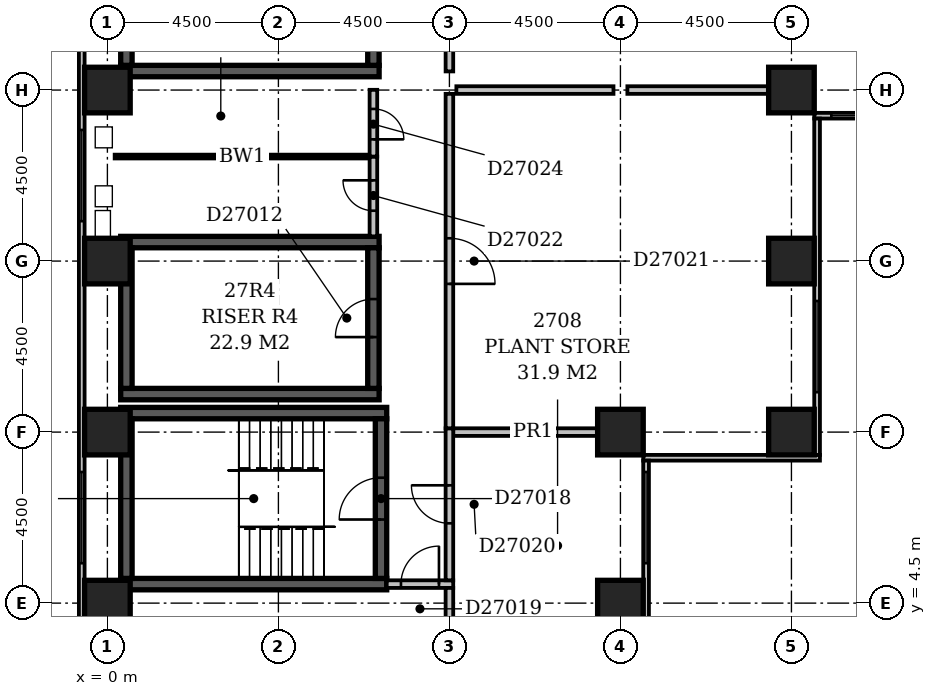
"""IFC4 building model, lengths in metres.
Left out: names, types, materials, properties, quantities, classifications, styles, units other than length and angle.
Written with IfcOpenShell. Run it as: python <this file> out.ifc"""

import sys

from ifc_helpers import new_model, si_unit, direction, frame, frame_2d, origin, origin_2d, place, context, subcontext, project, spatial, rectangle, extrude, element, fill, save


model = new_model("IFC4")
c1 = context("Model", 3, precision=1e-05, world=origin(), true_north=direction((0.0, 1.0)))
c2 = subcontext(c1, "Body", "Model", "MODEL_VIEW")
j1 = project(units=[si_unit("LENGTHUNIT", "METRE"), si_unit("PLANEANGLEUNIT", "RADIAN")], contexts=[c1])
p1 = place(None, origin())
s1 = spatial("IfcSite", under=j1, at=p1, CompositionType="ELEMENT")
p2 = place(p1, origin())
s2 = spatial("IfcBuilding", under=s1, at=p2, CompositionType="ELEMENT")
p3 = place(p2, frame((0.0, 0.0, 108.2)))
s3 = spatial("IfcBuildingStorey", under=s2, at=p3, CompositionType="ELEMENT", Elevation=108.2)
for number, where, z_axis, x_axis in (
    (1, (0.35, 5.0, -0.45), (0.0, 0.0, 1.0), (1.0, 0.0, 0.0)),
    (2, (0.35, 9.5, -0.45), (0.0, 0.0, 1.0), (1.0, 0.0, 0.0)),
):
    element("IfcWall", number, at=place(p3, frame(where, z_axis=z_axis, x_axis=x_axis)), inside=s3, PredefinedType="SHEAR", context=c2, shape_type="SweptSolid", body=[
        extrude(rectangle(XDim=7.0, YDim=0.3, at=frame_2d((3.5, 0.0))), origin(), (0.0, 0.0, 1.0), 5.35),
    ])
for number, where, z_axis, x_axis in (
    (3, (0.35, 10.0, -0.45), (0.0, 0.0, 1.0), (1.0, 0.0, 0.0)),
    (4, (0.35, 14.0, -0.45), (0.0, 0.0, 1.0), (1.0, 0.0, 0.0)),
    (5, (0.35, 18.5, -0.45), (0.0, 0.0, 1.0), (1.0, 0.0, 0.0)),
):
    element("IfcWall", number, at=place(p3, frame(where, z_axis=z_axis, x_axis=x_axis)), inside=s3, PredefinedType="SHEAR", context=c2, shape_type="SweptSolid", body=[
        extrude(rectangle(XDim=6.8, YDim=0.3, at=frame_2d((3.4, 0.0))), origin(), (0.0, 0.0, 1.0), 5.35),
    ])
p4 = place(p3, frame((0.5, 5.15, -0.45), z_axis=(0.0, 0.0, 1.0), x_axis=(0.0, 1.0, 0.0)))
e6 = element("IfcWall", 6, at=p4, inside=s3, PredefinedType="SHEAR", context=c2, shape_type="SweptSolid", body=[
    extrude(rectangle(XDim=4.2, YDim=0.3, at=frame_2d((2.1, 0.0))), origin(), (0.0, 0.0, 1.0), 5.35),
])
for number, where, z_axis, x_axis in (
    (7, (0.5, 10.15, -0.45), (0.0, 0.0, 1.0), (0.0, 1.0, 0.0)),
    (8, (0.5, 18.65, -0.45), (0.0, 0.0, 1.0), (0.0, 1.0, 0.0)),
):
    element("IfcWall", number, at=place(p3, frame(where, z_axis=z_axis, x_axis=x_axis)), inside=s3, PredefinedType="SHEAR", context=c2, shape_type="SweptSolid", body=[
        extrude(rectangle(XDim=3.7, YDim=0.3, at=frame_2d((1.85, 0.0))), origin(), (0.0, 0.0, 1.0), 5.35),
    ])
p5 = place(p3, frame((7.0, 10.15, -0.45), z_axis=(0.0, 0.0, 1.0), x_axis=(0.0, 1.0, 0.0)))
e9 = element("IfcWall", 9, at=p5, inside=s3, PredefinedType="SHEAR", context=c2, shape_type="SweptSolid", body=[
    extrude(rectangle(XDim=3.7, YDim=0.3, at=frame_2d((1.85, 0.0))), origin(), (0.0, 0.0, 1.0), 5.35),
])
p6 = place(p5, frame((1.35, 0.0, 0.45)))
e10 = element("IfcOpeningElement", 10, at=p6, cuts=e9, PredefinedType="OPENING", context=c2, shape_type="SweptSolid", body=[
    extrude(rectangle(XDim=1.0, YDim=2.1, at=frame_2d((0.5, 1.05))), frame((0.0, 0.162, 0.0), z_axis=(0.0, -1.0, 0.0), x_axis=(1.0, 0.0, 0.0)), (0.0, 0.0, 1.0), 0.324),
])
p7 = place(p3, frame((7.0, 18.65, -0.45), z_axis=(0.0, 0.0, 1.0), x_axis=(0.0, 1.0, 0.0)))
e11 = element("IfcWall", 11, at=p7, inside=s3, PredefinedType="SHEAR", context=c2, shape_type="SweptSolid", body=[
    extrude(rectangle(XDim=3.7, YDim=0.3, at=frame_2d((1.85, 0.0))), origin(), (0.0, 0.0, 1.0), 5.35),
])
p8 = place(p7, frame((1.35, 0.0, 0.45)))
e12 = element("IfcOpeningElement", 12, at=p8, cuts=e11, PredefinedType="OPENING", context=c2, shape_type="SweptSolid", body=[
    extrude(rectangle(XDim=1.0, YDim=2.1, at=frame_2d((0.5, 1.05))), frame((0.0, 0.162, 0.0), z_axis=(0.0, -1.0, 0.0), x_axis=(1.0, 0.0, 0.0)), (0.0, 0.0, 1.0), 0.324),
])
p9 = place(p3, frame((7.2, 5.15, -0.45), z_axis=(0.0, 0.0, 1.0), x_axis=(0.0, 1.0, 0.0)))
e13 = element("IfcWall", 13, at=p9, inside=s3, PredefinedType="SHEAR", context=c2, shape_type="SweptSolid", body=[
    extrude(rectangle(XDim=4.2, YDim=0.3, at=frame_2d((2.1, 0.0))), origin(), (0.0, 0.0, 1.0), 5.35),
])
p10 = place(p9, frame((1.55, 0.0, 0.45)))
e14 = element("IfcOpeningElement", 14, at=p10, cuts=e13, PredefinedType="OPENING", context=c2, shape_type="SweptSolid", body=[
    extrude(rectangle(XDim=1.1, YDim=2.1, at=frame_2d((0.55, 1.05))), frame((0.0, 0.162, 0.0), z_axis=(0.0, -1.0, 0.0), x_axis=(1.0, 0.0, 0.0)), (0.0, 0.0, 1.0), 0.324),
])
for number, where, z_axis, x_axis in (
    (15, (0.0, 4.5, -0.45), (0.0, 0.0, 1.0), (1.0, 0.0, 0.0)),
    (16, (13.5, 4.5, -0.45), (0.0, 0.0, 1.0), (1.0, 0.0, 0.0)),
    (17, (0.0, 9.0, -0.45), (0.0, 0.0, 1.0), (1.0, 0.0, 0.0)),
    (18, (13.5, 9.0, -0.45), (0.0, 0.0, 1.0), (1.0, 0.0, 0.0)),
    (19, (18.0, 9.0, -0.45), (0.0, 0.0, 1.0), (1.0, 0.0, 0.0)),
    (20, (0.0, 13.5, -0.45), (0.0, 0.0, 1.0), (1.0, 0.0, 0.0)),
    (21, (18.0, 13.5, -0.45), (0.0, 0.0, 1.0), (1.0, 0.0, 0.0)),
    (22, (0.0, 18.0, -0.45), (0.0, 0.0, 1.0), (1.0, 0.0, 0.0)),
    (23, (18.0, 18.0, -0.45), (0.0, 0.0, 1.0), (1.0, 0.0, 0.0)),
):
    element("IfcColumn", number, at=place(p3, frame(where, z_axis=z_axis, x_axis=x_axis)), inside=s3, PredefinedType="COLUMN", context=c2, shape_type="SweptSolid", body=[
        extrude(rectangle(XDim=1.2, YDim=1.2, at=origin_2d()), origin(), (0.0, 0.0, 1.0), 5.35),
    ])
p11 = place(p3, frame((14.175, 3.9, 0.0), z_axis=(0.0, 0.0, 1.0), x_axis=(0.0, 1.0, 0.0)))
e24 = element("IfcWall", 24, at=p11, inside=s3, PredefinedType="STANDARD", context=c2, shape_type="SweptSolid", body=[
    extrude(rectangle(XDim=4.35, YDim=0.15, at=frame_2d((2.175, 0.0))), origin(), (0.0, 0.0, 1.0), 4.3),
])
p12 = place(p11, frame((1.65, 0.0, 0.6)))
e25 = element("IfcOpeningElement", 25, at=p12, cuts=e24, PredefinedType="OPENING", context=c2, shape_type="SweptSolid", body=[
    extrude(rectangle(XDim=2.4, YDim=2.4, at=frame_2d((1.2, 1.2))), frame((0.0, 0.087, 0.0), z_axis=(0.0, -1.0, 0.0), x_axis=(1.0, 0.0, 0.0)), (0.0, 0.0, 1.0), 0.174),
])
p13 = place(p3, frame((14.1, 8.325, 0.0), z_axis=(0.0, 0.0, 1.0), x_axis=(1.0, 0.0, 0.0)))
e26 = element("IfcWall", 26, at=p13, inside=s3, PredefinedType="STANDARD", context=c2, shape_type="SweptSolid", body=[
    extrude(rectangle(XDim=4.65, YDim=0.15, at=frame_2d((2.325, 0.0))), origin(), (0.0, 0.0, 1.0), 4.3),
])
p14 = place(p3, frame((18.675, 8.4, 0.0), z_axis=(0.0, 0.0, 1.0), x_axis=(0.0, 1.0, 0.0)))
e27 = element("IfcWall", 27, at=p14, inside=s3, PredefinedType="STANDARD", context=c2, shape_type="SweptSolid", body=[
    extrude(rectangle(XDim=8.85, YDim=0.15, at=frame_2d((4.425, 0.0))), origin(), (0.0, 0.0, 1.0), 4.3),
])
p15 = place(p14, frame((1.65, 0.0, 0.6)))
e28 = element("IfcOpeningElement", 28, at=p15, cuts=e27, PredefinedType="OPENING", context=c2, shape_type="SweptSolid", body=[
    extrude(rectangle(XDim=2.4, YDim=2.4, at=frame_2d((1.2, 1.2))), frame((0.0, 0.087, 0.0), z_axis=(0.0, -1.0, 0.0), x_axis=(1.0, 0.0, 0.0)), (0.0, 0.0, 1.0), 0.174),
])
p16 = place(p3, frame((18.6, 17.325, 0.0), z_axis=(0.0, 0.0, 1.0), x_axis=(1.0, 0.0, 0.0)))
e29 = element("IfcWall", 29, at=p16, inside=s3, PredefinedType="STANDARD", context=c2, shape_type="SweptSolid", body=[
    extrude(rectangle(XDim=4.65, YDim=0.15, at=frame_2d((2.325, 0.0))), origin(), (0.0, 0.0, 1.0), 4.3),
])
p17 = place(p16, frame((0.45, 0.0, 0.6)))
e30 = element("IfcOpeningElement", 30, at=p17, cuts=e29, PredefinedType="OPENING", context=c2, shape_type="SweptSolid", body=[
    extrude(rectangle(XDim=2.4, YDim=2.4, at=frame_2d((1.2, 1.2))), frame((0.0, 0.087, 0.0), z_axis=(0.0, -1.0, 0.0), x_axis=(1.0, 0.0, 0.0)), (0.0, 0.0, 1.0), 0.174),
])
p18 = place(p3, frame((-0.675, 59.1, 0.0), z_axis=(0.0, 0.0, 1.0), x_axis=(0.0, -1.0, 0.0)))
e31 = element("IfcWall", 31, at=p18, inside=s3, PredefinedType="STANDARD", context=c2, shape_type="SweptSolid", body=[
    extrude(rectangle(XDim=55.35, YDim=0.15, at=frame_2d((27.675, 0.0))), origin(), (0.0, 0.0, 1.0), 4.3),
])
p19 = place(p18, frame((5.95, 0.0, 0.6)))
e32 = element("IfcOpeningElement", 32, at=p19, cuts=e31, PredefinedType="OPENING", context=c2, shape_type="SweptSolid", body=[
    extrude(rectangle(XDim=2.4, YDim=2.4, at=frame_2d((1.2, 1.2))), frame((0.0, 0.087, 0.0), z_axis=(0.0, -1.0, 0.0), x_axis=(1.0, 0.0, 0.0)), (0.0, 0.0, 1.0), 0.174),
])
p20 = place(p18, frame((15.15, 0.0, 0.6)))
e33 = element("IfcOpeningElement", 33, at=p20, cuts=e31, PredefinedType="OPENING", context=c2, shape_type="SweptSolid", body=[
    extrude(rectangle(XDim=2.4, YDim=2.4, at=frame_2d((1.2, 1.2))), frame((0.0, 0.087, 0.0), z_axis=(0.0, -1.0, 0.0), x_axis=(1.0, 0.0, 0.0)), (0.0, 0.0, 1.0), 0.174),
])
p21 = place(p18, frame((24.15, 0.0, 0.6)))
e34 = element("IfcOpeningElement", 34, at=p21, cuts=e31, PredefinedType="OPENING", context=c2, shape_type="SweptSolid", body=[
    extrude(rectangle(XDim=2.4, YDim=2.4, at=frame_2d((1.2, 1.2))), frame((0.0, 0.087, 0.0), z_axis=(0.0, -1.0, 0.0), x_axis=(1.0, 0.0, 0.0)), (0.0, 0.0, 1.0), 0.174),
])
p22 = place(p18, frame((32.95, 0.0, 0.6)))
e35 = element("IfcOpeningElement", 35, at=p22, cuts=e31, PredefinedType="OPENING", context=c2, shape_type="SweptSolid", body=[
    extrude(rectangle(XDim=2.4, YDim=2.4, at=frame_2d((1.2, 1.2))), frame((0.0, 0.087, 0.0), z_axis=(0.0, -1.0, 0.0), x_axis=(1.0, 0.0, 0.0)), (0.0, 0.0, 1.0), 0.174),
])
p23 = place(p18, frame((42.15, 0.0, 0.6)))
e36 = element("IfcOpeningElement", 36, at=p23, cuts=e31, PredefinedType="OPENING", context=c2, shape_type="SweptSolid", body=[
    extrude(rectangle(XDim=2.4, YDim=2.4, at=frame_2d((1.2, 1.2))), frame((0.0, 0.087, 0.0), z_axis=(0.0, -1.0, 0.0), x_axis=(1.0, 0.0, 0.0)), (0.0, 0.0, 1.0), 0.174),
])
p24 = place(p18, frame((51.15, 0.0, 0.6)))
e37 = element("IfcOpeningElement", 37, at=p24, cuts=e31, PredefinedType="OPENING", context=c2, shape_type="SweptSolid", body=[
    extrude(rectangle(XDim=2.4, YDim=2.4, at=frame_2d((1.2, 1.2))), frame((0.0, 0.087, 0.0), z_axis=(0.0, -1.0, 0.0), x_axis=(1.0, 0.0, 0.0)), (0.0, 0.0, 1.0), 0.174),
])
p25 = place(p3, frame((9.0, 0.271, 0.0), z_axis=(0.0, 0.0, 1.0), x_axis=(0.0, 1.0, 0.0)))
e38 = element("IfcWall", 38, at=p25, inside=s3, PredefinedType="PARTITIONING", context=c2, shape_type="SweptSolid", body=[
    extrude(rectangle(XDim=4.629, YDim=0.2, at=frame_2d((2.314, 0.0))), origin(), (0.0, 0.0, 1.0), 4.9),
])
p26 = place(p3, frame((7.35, 5.0, 0.0), z_axis=(0.0, 0.0, 1.0), x_axis=(1.0, 0.0, 0.0)))
e39 = element("IfcWall", 39, at=p26, inside=s3, PredefinedType="PARTITIONING", context=c2, shape_type="SweptSolid", body=[
    extrude(rectangle(XDim=1.75, YDim=0.2, at=frame_2d((0.875, 0.0))), origin(), (0.0, 0.0, 1.0), 4.9),
])
p27 = place(p26, frame((0.375, 0.0, 0.0)))
e40 = element("IfcOpeningElement", 40, at=p27, cuts=e39, PredefinedType="OPENING", context=c2, shape_type="SweptSolid", body=[
    extrude(rectangle(XDim=1.0, YDim=2.1, at=frame_2d((0.5, 1.05))), frame((0.0, 0.112, 0.0), z_axis=(0.0, -1.0, 0.0), x_axis=(1.0, 0.0, 0.0)), (0.0, 0.0, 1.0), 0.224),
])
p28 = place(p3, frame((9.0, 5.1, 0.0), z_axis=(0.0, 0.0, 1.0), x_axis=(0.0, 1.0, 0.0)))
e41 = element("IfcWall", 41, at=p28, inside=s3, PredefinedType="PARTITIONING", context=c2, shape_type="SweptSolid", body=[
    extrude(rectangle(XDim=4.0, YDim=0.2, at=frame_2d((2.0, 0.0))), origin(), (0.0, 0.0, 1.0), 4.9),
])
p29 = place(p28, frame((1.5, 0.0, 0.0)))
e42 = element("IfcOpeningElement", 42, at=p29, cuts=e41, PredefinedType="OPENING", context=c2, shape_type="SweptSolid", body=[
    extrude(rectangle(XDim=1.0, YDim=2.1, at=frame_2d((0.5, 1.05))), frame((0.0, 0.112, 0.0), z_axis=(0.0, -1.0, 0.0), x_axis=(1.0, 0.0, 0.0)), (0.0, 0.0, 1.0), 0.224),
])
p30 = place(p3, frame((9.0, 9.1, 0.0), z_axis=(0.0, 0.0, 1.0), x_axis=(0.0, 1.0, 0.0)))
e43 = element("IfcWall", 43, at=p30, inside=s3, PredefinedType="PARTITIONING", context=c2, shape_type="SweptSolid", body=[
    extrude(rectangle(XDim=8.8, YDim=0.2, at=frame_2d((4.4, 0.0))), origin(), (0.0, 0.0, 1.0), 4.9),
])
p31 = place(p30, frame((3.8, 0.0, 0.0)))
e44 = element("IfcOpeningElement", 44, at=p31, cuts=e43, PredefinedType="OPENING", context=c2, shape_type="SweptSolid", body=[
    extrude(rectangle(XDim=1.2, YDim=2.1, at=frame_2d((0.6, 1.05))), frame((0.0, 0.112, 0.0), z_axis=(0.0, -1.0, 0.0), x_axis=(1.0, 0.0, 0.0)), (0.0, 0.0, 1.0), 0.224),
])
p32 = place(p3, frame((13.309, 9.0, 0.0), z_axis=(0.0, 0.0, 1.0), x_axis=(-1.0, 0.0, 0.0)))
e45 = element("IfcWall", 45, at=p32, inside=s3, PredefinedType="PARTITIONING", context=c2, shape_type="SweptSolid", body=[
    extrude(rectangle(XDim=4.208, YDim=0.2, at=frame_2d((2.104, 0.0))), origin(), (0.0, 0.0, 1.0), 4.9),
])
p33 = place(p3, frame((0.191, 16.25, 0.0), z_axis=(0.0, 0.0, 1.0), x_axis=(1.0, 0.0, 0.0)))
e46 = element("IfcWall", 46, at=p33, inside=s3, PredefinedType="PLUMBINGWALL", context=c2, shape_type="SweptSolid", body=[
    extrude(rectangle(XDim=6.708, YDim=0.1, at=frame_2d((3.354, 0.0))), origin(), (0.0, 0.0, 1.0), 4.9),
])
p34 = place(p3, frame((7.0, 16.25, 0.0), z_axis=(0.0, 0.0, 1.0), x_axis=(0.0, -1.0, 0.0)))
e47 = element("IfcWall", 47, at=p34, inside=s3, PredefinedType="PARTITIONING", context=c2, shape_type="SweptSolid", body=[
    extrude(rectangle(XDim=2.1, YDim=0.2, at=frame_2d((1.05, 0.0))), origin(), (0.0, 0.0, 1.0), 4.9),
])
p35 = place(p34, frame((0.625, 0.0, 0.0)))
e48 = element("IfcOpeningElement", 48, at=p35, cuts=e47, PredefinedType="OPENING", context=c2, shape_type="SweptSolid", body=[
    extrude(rectangle(XDim=0.8, YDim=2.1, at=frame_2d((0.4, 1.05))), frame((0.0, 0.112, 0.0), z_axis=(0.0, -1.0, 0.0), x_axis=(1.0, 0.0, 0.0)), (0.0, 0.0, 1.0), 0.224),
])
p36 = place(p3, frame((9.0, 18.49, 0.0), z_axis=(0.0, 0.0, 1.0), x_axis=(0.0, 1.0, 0.0)))
e49 = element("IfcWall", 49, at=p36, inside=s3, PredefinedType="PARTITIONING", context=c2, shape_type="SweptSolid", body=[
    extrude(rectangle(XDim=8.409, YDim=0.2, at=frame_2d((4.205, 0.0))), origin(), (0.0, 0.0, 1.0), 4.9),
])
p37 = place(p36, frame((3.605, 0.0, 0.0)))
e50 = element("IfcOpeningElement", 50, at=p37, cuts=e49, PredefinedType="OPENING", context=c2, shape_type="SweptSolid", body=[
    extrude(rectangle(XDim=1.2, YDim=2.1, at=frame_2d((0.6, 1.05))), frame((0.0, 0.112, 0.0), z_axis=(0.0, -1.0, 0.0), x_axis=(1.0, 0.0, 0.0)), (0.0, 0.0, 1.0), 0.224),
])
p38 = place(p3, frame((17.809, 18.0, 0.0), z_axis=(0.0, 0.0, 1.0), x_axis=(-1.0, 0.0, 0.0)))
e51 = element("IfcWall", 51, at=p38, inside=s3, PredefinedType="PARTITIONING", context=c2, shape_type="SweptSolid", body=[
    extrude(rectangle(XDim=4.125, YDim=0.2, at=frame_2d((2.063, 0.0))), origin(), (0.0, 0.0, 1.0), 4.9),
])
p39 = place(p3, frame((13.317, 18.0, 0.0), z_axis=(0.0, 0.0, 1.0), x_axis=(-1.0, 0.0, 0.0)))
e52 = element("IfcWall", 52, at=p39, inside=s3, PredefinedType="PARTITIONING", context=c2, shape_type="SweptSolid", body=[
    extrude(rectangle(XDim=4.134, YDim=0.2, at=frame_2d((2.067, 0.0))), origin(), (0.0, 0.0, 1.0), 4.9),
])
p40 = place(p3, frame((7.0, 18.006, 0.0), z_axis=(0.0, 0.0, 1.0), x_axis=(0.0, -1.0, 0.0)))
e53 = element("IfcWall", 53, at=p40, inside=s3, PredefinedType="PARTITIONING", context=c2, shape_type="SweptSolid", body=[
    extrude(rectangle(XDim=1.756, YDim=0.2, at=frame_2d((0.878, 0.0))), origin(), (0.0, 0.0, 1.0), 4.9),
])
p41 = place(p40, frame((0.503, 0.0, 0.0)))
e54 = element("IfcOpeningElement", 54, at=p41, cuts=e53, PredefinedType="OPENING", context=c2, shape_type="SweptSolid", body=[
    extrude(rectangle(XDim=0.8, YDim=2.1, at=frame_2d((0.4, 1.05))), frame((0.0, 0.112, 0.0), z_axis=(0.0, -1.0, 0.0), x_axis=(1.0, 0.0, 0.0)), (0.0, 0.0, 1.0), 0.224),
])
p42 = place(p12, origin())
e55 = element("IfcWindow", 55, at=p42, inside=s3, PartitioningType="SINGLE_PANEL", PredefinedType="USERDEFINED", context=c2, shape_type="SweptSolid", body=[
    extrude(rectangle(XDim=2.4, YDim=2.4, at=frame_2d((1.2, 1.2))), frame((0.0, 0.03, 0.0), z_axis=(0.0, -1.0, 0.0), x_axis=(1.0, 0.0, 0.0)), (0.0, 0.0, 1.0), 0.06),
])
fill(e25, e55)
p43 = place(p15, origin())
e56 = element("IfcWindow", 56, at=p43, inside=s3, PartitioningType="SINGLE_PANEL", PredefinedType="USERDEFINED", context=c2, shape_type="SweptSolid", body=[
    extrude(rectangle(XDim=2.4, YDim=2.4, at=frame_2d((1.2, 1.2))), frame((0.0, 0.03, 0.0), z_axis=(0.0, -1.0, 0.0), x_axis=(1.0, 0.0, 0.0)), (0.0, 0.0, 1.0), 0.06),
])
fill(e28, e56)
p44 = place(p17, origin())
e57 = element("IfcWindow", 57, at=p44, inside=s3, PartitioningType="SINGLE_PANEL", PredefinedType="USERDEFINED", context=c2, shape_type="SweptSolid", body=[
    extrude(rectangle(XDim=2.4, YDim=2.4, at=frame_2d((1.2, 1.2))), frame((0.0, 0.03, 0.0), z_axis=(0.0, -1.0, 0.0), x_axis=(1.0, 0.0, 0.0)), (0.0, 0.0, 1.0), 0.06),
])
fill(e30, e57)
p45 = place(p23, origin())
e58 = element("IfcWindow", 58, at=p45, inside=s3, PartitioningType="SINGLE_PANEL", PredefinedType="USERDEFINED", context=c2, shape_type="SweptSolid", body=[
    extrude(rectangle(XDim=2.4, YDim=2.4, at=frame_2d((1.2, 1.2))), frame((0.0, 0.03, 0.0), z_axis=(0.0, -1.0, 0.0), x_axis=(1.0, 0.0, 0.0)), (0.0, 0.0, 1.0), 0.06),
])
fill(e36, e58)
p46 = place(p24, origin())
e59 = element("IfcWindow", 59, at=p46, inside=s3, PartitioningType="SINGLE_PANEL", PredefinedType="USERDEFINED", context=c2, shape_type="SweptSolid", body=[
    extrude(rectangle(XDim=2.4, YDim=2.4, at=frame_2d((1.2, 1.2))), frame((0.0, 0.03, 0.0), z_axis=(0.0, -1.0, 0.0), x_axis=(1.0, 0.0, 0.0)), (0.0, 0.0, 1.0), 0.06),
])
fill(e37, e59)
p47 = place(p6, origin())
e60 = element("IfcDoor", 60, at=p47, inside=s3, OperationType="SINGLE_SWING_LEFT", PredefinedType="DOOR", context=c2, shape_type="SweptSolid", body=[
    extrude(rectangle(XDim=1.0, YDim=2.1, at=frame_2d((0.5, 1.05))), frame((0.0, 0.025, 0.0), z_axis=(0.0, -1.0, 0.0), x_axis=(1.0, 0.0, 0.0)), (0.0, 0.0, 1.0), 0.05),
])
fill(e10, e60)
p48 = place(p10, origin())
e61 = element("IfcDoor", 61, at=p48, inside=s3, OperationType="SINGLE_SWING_LEFT", PredefinedType="DOOR", context=c2, shape_type="SweptSolid", body=[
    extrude(rectangle(XDim=1.1, YDim=2.1, at=frame_2d((0.55, 1.05))), frame((0.0, 0.025, 0.0), z_axis=(0.0, -1.0, 0.0), x_axis=(1.0, 0.0, 0.0)), (0.0, 0.0, 1.0), 0.05),
])
fill(e14, e61)
p49 = place(p27, frame((1.0, 0.0, 0.0), z_axis=(0.0, 0.0, 1.0), x_axis=(-1.0, 0.0, 0.0)))
e62 = element("IfcDoor", 62, at=p49, inside=s3, OperationType="SINGLE_SWING_LEFT", PredefinedType="DOOR", context=c2, shape_type="SweptSolid", body=[
    extrude(rectangle(XDim=1.0, YDim=2.1, at=frame_2d((0.5, 1.05))), frame((0.0, 0.025, 0.0), z_axis=(0.0, -1.0, 0.0), x_axis=(1.0, 0.0, 0.0)), (0.0, 0.0, 1.0), 0.05),
])
fill(e40, e62)
p50 = place(p29, frame((1.0, 0.0, 0.0), z_axis=(0.0, 0.0, 1.0), x_axis=(-1.0, 0.0, 0.0)))
e63 = element("IfcDoor", 63, at=p50, inside=s3, OperationType="SINGLE_SWING_LEFT", PredefinedType="DOOR", context=c2, shape_type="SweptSolid", body=[
    extrude(rectangle(XDim=1.0, YDim=2.1, at=frame_2d((0.5, 1.05))), frame((0.0, 0.025, 0.0), z_axis=(0.0, -1.0, 0.0), x_axis=(1.0, 0.0, 0.0)), (0.0, 0.0, 1.0), 0.05),
])
fill(e42, e63)
p51 = place(p31, frame((1.2, 0.0, 0.0), z_axis=(0.0, 0.0, 1.0), x_axis=(-1.0, 0.0, 0.0)))
e64 = element("IfcDoor", 64, at=p51, inside=s3, OperationType="SINGLE_SWING_RIGHT", PredefinedType="DOOR", context=c2, shape_type="SweptSolid", body=[
    extrude(rectangle(XDim=1.2, YDim=2.1, at=frame_2d((0.6, 1.05))), frame((0.0, 0.025, 0.0), z_axis=(0.0, -1.0, 0.0), x_axis=(1.0, 0.0, 0.0)), (0.0, 0.0, 1.0), 0.05),
])
fill(e44, e64)
p52 = place(p35, frame((0.8, 0.0, 0.0), z_axis=(0.0, 0.0, 1.0), x_axis=(-1.0, 0.0, 0.0)))
e65 = element("IfcDoor", 65, at=p52, inside=s3, OperationType="SINGLE_SWING_RIGHT", PredefinedType="DOOR", context=c2, shape_type="SweptSolid", body=[
    extrude(rectangle(XDim=0.8, YDim=2.1, at=frame_2d((0.4, 1.05))), frame((0.0, 0.025, 0.0), z_axis=(0.0, -1.0, 0.0), x_axis=(1.0, 0.0, 0.0)), (0.0, 0.0, 1.0), 0.05),
])
fill(e48, e65)
p53 = place(p41, frame((0.8, 0.0, 0.0), z_axis=(0.0, 0.0, 1.0), x_axis=(-1.0, 0.0, 0.0)))
e66 = element("IfcDoor", 66, at=p53, inside=s3, OperationType="SINGLE_SWING_LEFT", PredefinedType="DOOR", context=c2, shape_type="SweptSolid", body=[
    extrude(rectangle(XDim=0.8, YDim=2.1, at=frame_2d((0.4, 1.05))), frame((0.0, 0.025, 0.0), z_axis=(0.0, -1.0, 0.0), x_axis=(1.0, 0.0, 0.0)), (0.0, 0.0, 1.0), 0.05),
])
fill(e54, e66)
save(model, sys.argv[1])
